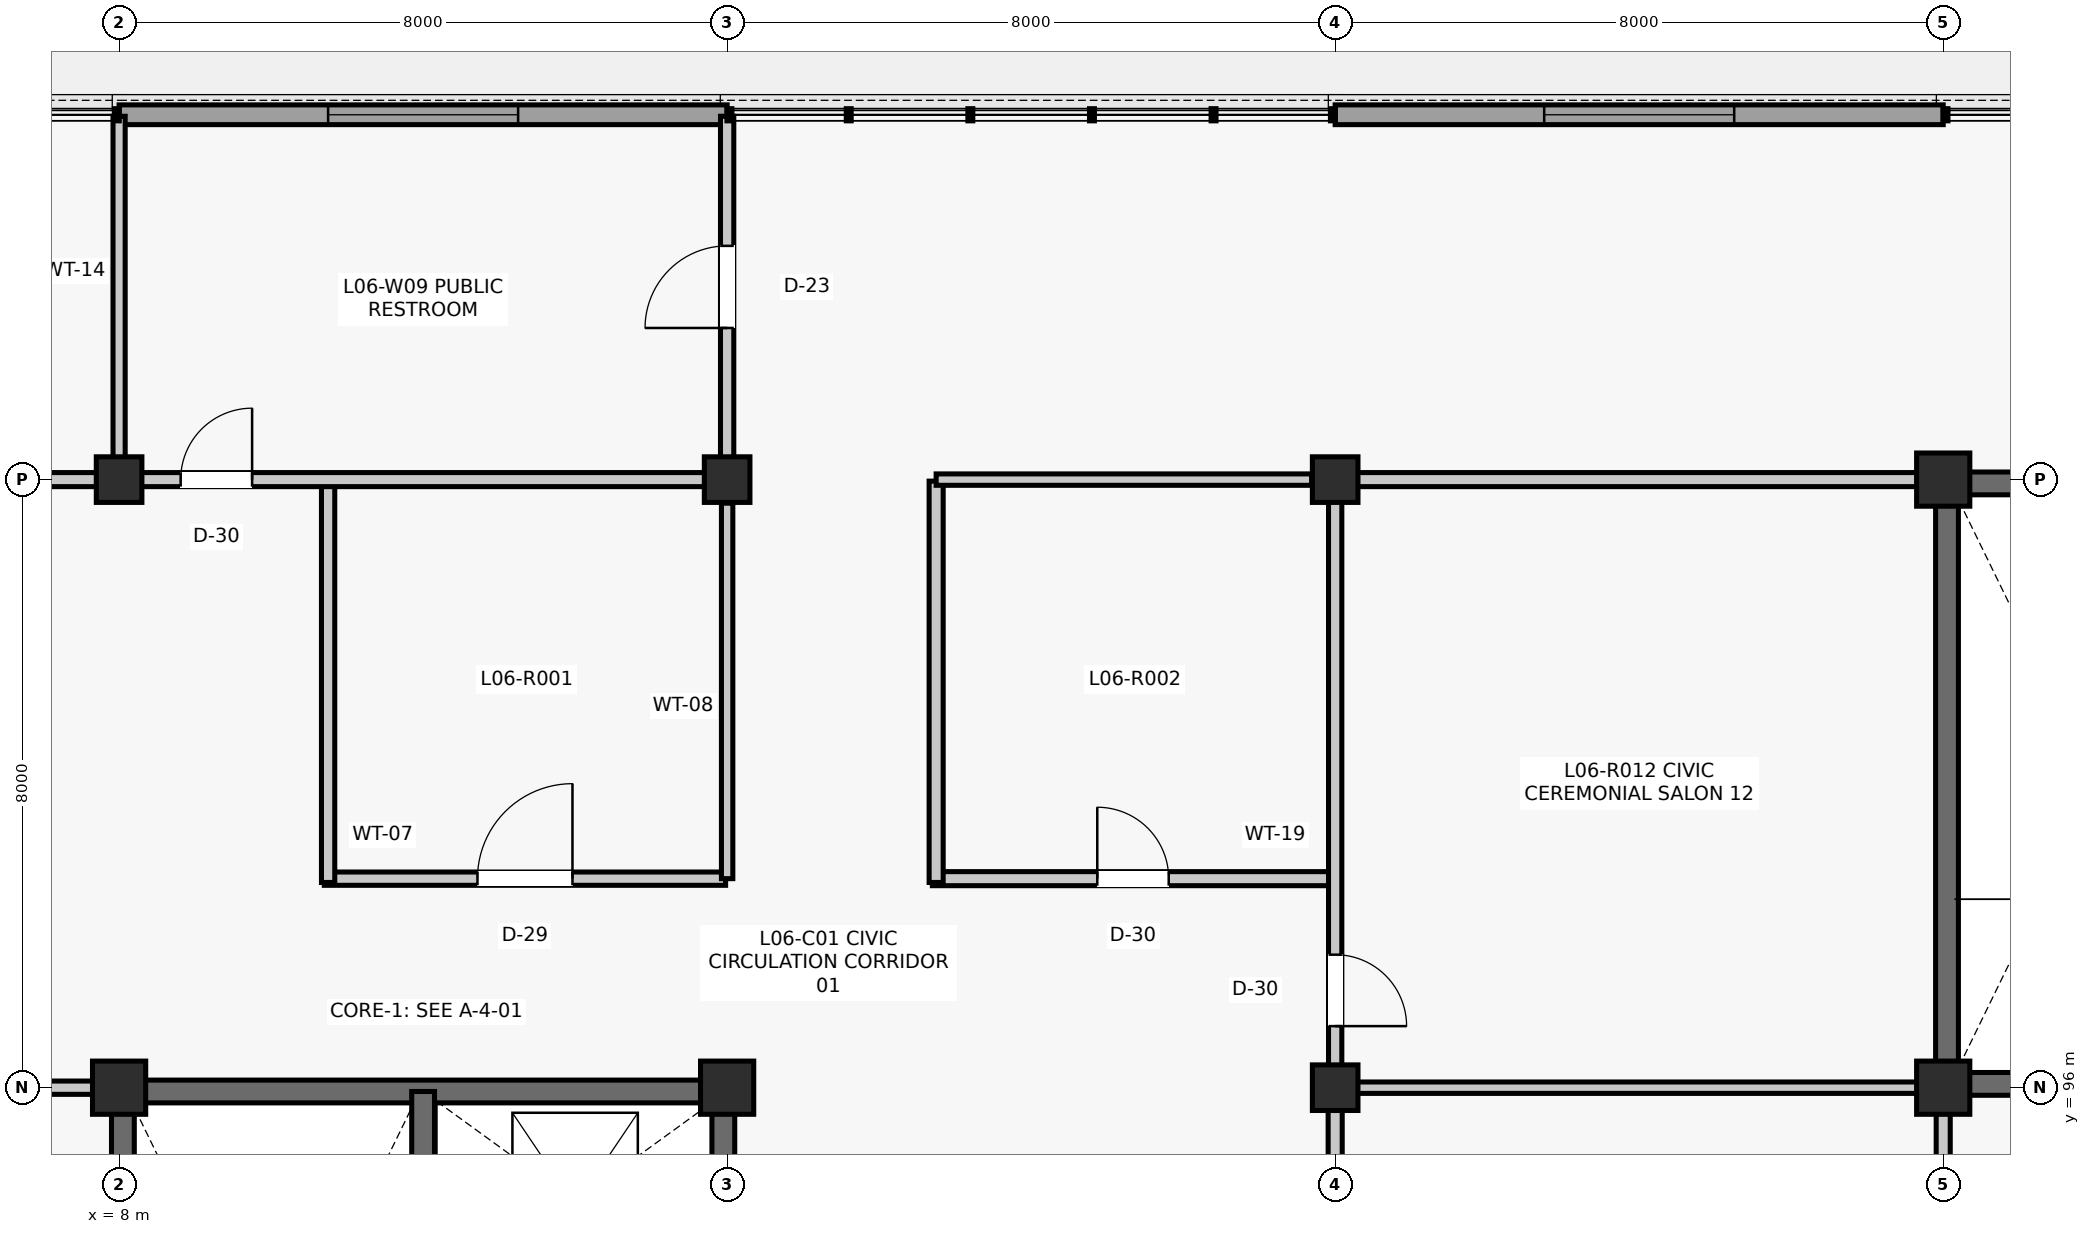
"""IFC4 building model, lengths in metres.
Left out: names, types, materials, properties, quantities, classifications, styles, units other than length and angle.
Written with IfcOpenShell. Run it as: python <this file> out.ifc"""

import sys

from ifc_helpers import new_model, si_unit, direction, frame, frame_2d, origin, origin_2d, place, context, subcontext, project, spatial, rectangle, extrude, element, fill, save


model = new_model("IFC4")
c1 = context("Model", 3, precision=1e-05, world=origin(), true_north=direction((0.0, 1.0)))
c2 = subcontext(c1, "Body", "Model", "MODEL_VIEW")
j1 = project(units=[si_unit("LENGTHUNIT", "METRE"), si_unit("PLANEANGLEUNIT", "RADIAN")], contexts=[c1])
p1 = place(None, origin())
s1 = spatial("IfcSite", under=j1, at=p1, CompositionType="ELEMENT")
p2 = place(p1, origin())
s2 = spatial("IfcBuilding", under=s1, at=p2, CompositionType="ELEMENT")
p3 = place(p2, frame((0.0, 0.0, 25.74)))
s3 = spatial("IfcBuildingStorey", under=s2, at=p3, CompositionType="ELEMENT", Elevation=25.74)
p4 = place(p3, frame((8.0, 96.0, 0.0), z_axis=(0.0, 0.0, 1.0), x_axis=(1.0, 0.0, 0.0)))
e1 = element("IfcColumn", 1, at=p4, inside=s3, PredefinedType="COLUMN", context=c2, shape_type="SweptSolid", body=[
    extrude(rectangle(XDim=0.7, YDim=0.7, at=origin_2d()), origin(), (0.0, 0.0, 1.0), 4.29),
])
p5 = place(p3, frame((8.0, 104.0, 0.0), z_axis=(0.0, 0.0, 1.0), x_axis=(1.0, 0.0, 0.0)))
e2 = element("IfcColumn", 2, at=p5, inside=s3, PredefinedType="COLUMN", context=c2, shape_type="SweptSolid", body=[
    extrude(rectangle(XDim=0.6, YDim=0.6, at=origin_2d()), origin(), (0.0, 0.0, 1.0), 4.29),
])
p6 = place(p3, frame((16.0, 96.0, 0.0), z_axis=(0.0, 0.0, 1.0), x_axis=(1.0, 0.0, 0.0)))
e3 = element("IfcColumn", 3, at=p6, inside=s3, PredefinedType="COLUMN", context=c2, shape_type="SweptSolid", body=[
    extrude(rectangle(XDim=0.7, YDim=0.7, at=origin_2d()), origin(), (0.0, 0.0, 1.0), 4.29),
])
for number, where, z_axis, x_axis in (
    (4, (16.0, 104.0, 0.0), (0.0, 0.0, 1.0), (1.0, 0.0, 0.0)),
    (5, (24.0, 96.0, 0.0), (0.0, 0.0, 1.0), (1.0, 0.0, 0.0)),
    (6, (24.0, 104.0, 0.0), (0.0, 0.0, 1.0), (1.0, 0.0, 0.0)),
):
    element("IfcColumn", number, at=place(p3, frame(where, z_axis=z_axis, x_axis=x_axis)), inside=s3, PredefinedType="COLUMN", context=c2, shape_type="SweptSolid", body=[
        extrude(rectangle(XDim=0.6, YDim=0.6, at=origin_2d()), origin(), (0.0, 0.0, 1.0), 4.29),
    ])
for number, where, z_axis, x_axis in (
    (7, (32.0, 96.0, 0.0), (0.0, 0.0, 1.0), (1.0, 0.0, 0.0)),
    (8, (32.0, 104.0, 0.0), (0.0, 0.0, 1.0), (1.0, 0.0, 0.0)),
):
    element("IfcColumn", number, at=place(p3, frame(where, z_axis=z_axis, x_axis=x_axis)), inside=s3, PredefinedType="COLUMN", context=c2, shape_type="SweptSolid", body=[
        extrude(rectangle(XDim=0.7, YDim=0.7, at=origin_2d()), origin(), (0.0, 0.0, 1.0), 4.29),
    ])
p7 = place(p3, frame((8.0, 108.8, 0.0), z_axis=(0.0, 0.0, 1.0), x_axis=(1.0, 0.0, 0.0)))
e9 = element("IfcWall", 9, at=p7, inside=s3, PredefinedType="SOLIDWALL", context=c2, shape_type="SweptSolid", body=[
    extrude(rectangle(XDim=8.0, YDim=0.26, at=frame_2d((4.0, 0.0))), origin(), (0.0, 0.0, 1.0), 4.09),
])
p8 = place(p7, frame((2.75, 0.0, 0.85)))
e10 = element("IfcOpeningElement", 10, at=p8, cuts=e9, PredefinedType="OPENING", context=c2, shape_type="SweptSolid", body=[
    extrude(rectangle(XDim=2.5, YDim=2.2, at=frame_2d((1.25, 1.1))), frame((0.0, 0.14, 0.0), z_axis=(0.0, -1.0, 0.0), x_axis=(1.0, 0.0, 0.0)), (0.0, 0.0, 1.0), 0.28),
])
p9 = place(p3, frame((24.0, 108.8, 0.0), z_axis=(0.0, 0.0, 1.0), x_axis=(1.0, 0.0, 0.0)))
e11 = element("IfcWall", 11, at=p9, inside=s3, PredefinedType="SOLIDWALL", context=c2, shape_type="SweptSolid", body=[
    extrude(rectangle(XDim=8.0, YDim=0.26, at=frame_2d((4.0, 0.0))), origin(), (0.0, 0.0, 1.0), 4.09),
])
p10 = place(p9, frame((2.75, 0.0, 0.85)))
e12 = element("IfcOpeningElement", 12, at=p10, cuts=e11, PredefinedType="OPENING", context=c2, shape_type="SweptSolid", body=[
    extrude(rectangle(XDim=2.5, YDim=2.2, at=frame_2d((1.25, 1.1))), frame((0.0, 0.14, 0.0), z_axis=(0.0, -1.0, 0.0), x_axis=(1.0, 0.0, 0.0)), (0.0, 0.0, 1.0), 0.28),
])
for number, where, z_axis, x_axis in (
    (13, (8.05, 88.24, 0.0), (0.0, 0.0, 1.0), (0.0, 1.0, 0.0)),
    (14, (8.24, 95.95, 0.0), (0.0, 0.0, 1.0), (1.0, 0.0, 0.0)),
):
    element("IfcWall", number, at=place(p3, frame(where, z_axis=z_axis, x_axis=x_axis)), inside=s3, PredefinedType="SHEAR", context=c2, shape_type="SweptSolid", body=[
        extrude(rectangle(XDim=7.52, YDim=0.3, at=frame_2d((3.76, 0.0))), origin(), (0.0, 0.0, 1.0), 4.09),
    ])
p11 = place(p3, frame((15.95, 88.24, 0.0), z_axis=(0.0, 0.0, 1.0), x_axis=(0.0, 1.0, 0.0)))
e15 = element("IfcWall", 15, at=p11, inside=s3, PredefinedType="SHEAR", context=c2, shape_type="SweptSolid", body=[
    extrude(rectangle(XDim=7.52, YDim=0.3, at=frame_2d((3.76, 0.0))), origin(), (0.0, 0.0, 1.0), 4.09),
])
p12 = place(p11, frame((3.55, 0.0, 0.0)))
e16 = element("IfcOpeningElement", 16, at=p12, cuts=e15, PredefinedType="OPENING", context=c2, shape_type="SweptSolid", body=[
    extrude(rectangle(XDim=1.05, YDim=2.15, at=frame_2d((0.525, 1.075))), frame((0.0, 0.16, 0.0), z_axis=(0.0, -1.0, 0.0), x_axis=(1.0, 0.0, 0.0)), (0.0, 0.0, 1.0), 0.32),
])
p13 = place(p3, frame((12.0, 88.05, 0.0), z_axis=(0.0, 0.0, 1.0), x_axis=(0.0, 1.0, 0.0)))
e17 = element("IfcWall", 17, at=p13, inside=s3, PredefinedType="SHEAR", context=c2, shape_type="SweptSolid", body=[
    extrude(rectangle(XDim=7.9, YDim=0.3, at=frame_2d((3.95, 0.0))), origin(), (0.0, 0.0, 1.0), 4.09),
])
p14 = place(p13, frame((0.55, 0.0, 0.0)))
e18 = element("IfcOpeningElement", 18, at=p14, cuts=e17, PredefinedType="OPENING", context=c2, shape_type="SweptSolid", body=[
    extrude(rectangle(XDim=1.1, YDim=2.15, at=frame_2d((0.55, 1.075))), frame((0.0, 0.16, 0.0), z_axis=(0.0, -1.0, 0.0), x_axis=(1.0, 0.0, 0.0)), (0.0, 0.0, 1.0), 0.32),
])
for number, where, z_axis, x_axis in (
    (19, (32.05, 96.24, 0.0), (0.0, 0.0, 1.0), (0.0, 1.0, 0.0)),
    (20, (32.24, 103.95, 0.0), (0.0, 0.0, 1.0), (1.0, 0.0, 0.0)),
):
    element("IfcWall", number, at=place(p3, frame(where, z_axis=z_axis, x_axis=x_axis)), inside=s3, PredefinedType="SHEAR", context=c2, shape_type="SweptSolid", body=[
        extrude(rectangle(XDim=7.52, YDim=0.3, at=frame_2d((3.76, 0.0))), origin(), (0.0, 0.0, 1.0), 4.09),
    ])
p15 = place(p3, frame((32.24, 96.05, 0.0), z_axis=(0.0, 0.0, 1.0), x_axis=(1.0, 0.0, 0.0)))
e21 = element("IfcWall", 21, at=p15, inside=s3, PredefinedType="SHEAR", context=c2, shape_type="SweptSolid", body=[
    extrude(rectangle(XDim=3.91, YDim=0.3, at=frame_2d((1.955, 0.0))), origin(), (0.0, 0.0, 1.0), 4.09),
])
p16 = place(p3, frame((10.7, 98.75, 0.0), z_axis=(0.0, 0.0, 1.0), x_axis=(1.0, 0.0, 0.0)))
e22 = element("IfcWall", 22, at=p16, inside=s3, PredefinedType="PARTITIONING", context=c2, shape_type="SweptSolid", body=[
    extrude(rectangle(XDim=5.28, YDim=0.175, at=frame_2d((2.64, 0.0))), origin(), (0.0, 0.0, 1.0), 3.408),
])
p17 = place(p16, frame((2.015, 0.0, 0.0)))
e23 = element("IfcOpeningElement", 23, at=p17, cuts=e22, PredefinedType="OPENING", context=c2, shape_type="SweptSolid", body=[
    extrude(rectangle(XDim=1.25, YDim=2.18, at=frame_2d((0.625, 1.09))), frame((0.0, 0.097, 0.0), z_axis=(0.0, -1.0, 0.0), x_axis=(1.0, 0.0, 0.0)), (0.0, 0.0, 1.0), 0.195),
])
p18 = place(p3, frame((10.75, 98.7, 0.0), z_axis=(0.0, 0.0, 1.0), x_axis=(0.0, 1.0, 0.0)))
e24 = element("IfcWall", 24, at=p18, inside=s3, PredefinedType="PARTITIONING", context=c2, shape_type="SweptSolid", body=[
    extrude(rectangle(XDim=5.28, YDim=0.175, at=frame_2d((2.64, 0.0))), origin(), (0.0, 0.0, 1.0), 3.408),
])
p19 = place(p3, frame((16.0, 98.75, 0.0), z_axis=(0.0, 0.0, 1.0), x_axis=(0.0, 1.0, 0.0)))
e25 = element("IfcWall", 25, at=p19, inside=s3, PredefinedType="PARTITIONING", context=c2, shape_type="SweptSolid", body=[
    extrude(rectangle(XDim=4.94, YDim=0.15, at=frame_2d((2.47, 0.0))), origin(), (0.0, 0.0, 1.0), 3.408),
])
p20 = place(p3, frame((18.7, 98.75, 0.0), z_axis=(0.0, 0.0, 1.0), x_axis=(1.0, 0.0, 0.0)))
e26 = element("IfcWall", 26, at=p20, inside=s3, PredefinedType="PARTITIONING", context=c2, shape_type="SweptSolid", body=[
    extrude(rectangle(XDim=5.28, YDim=0.185, at=frame_2d((2.64, 0.0))), origin(), (0.0, 0.0, 1.0), 3.408),
])
p21 = place(p20, frame((2.17, 0.0, 0.0)))
e27 = element("IfcOpeningElement", 27, at=p21, cuts=e26, PredefinedType="OPENING", context=c2, shape_type="SweptSolid", body=[
    extrude(rectangle(XDim=0.94, YDim=2.12, at=frame_2d((0.47, 1.06))), frame((0.0, 0.103, 0.0), z_axis=(0.0, -1.0, 0.0), x_axis=(1.0, 0.0, 0.0)), (0.0, 0.0, 1.0), 0.205),
])
p22 = place(p3, frame((18.75, 98.7, 0.0), z_axis=(0.0, 0.0, 1.0), x_axis=(0.0, 1.0, 0.0)))
e28 = element("IfcWall", 28, at=p22, inside=s3, PredefinedType="PARTITIONING", context=c2, shape_type="SweptSolid", body=[
    extrude(rectangle(XDim=5.28, YDim=0.185, at=frame_2d((2.64, 0.0))), origin(), (0.0, 0.0, 1.0), 3.408),
])
p23 = place(p3, frame((18.75, 104.0, 0.0), z_axis=(0.0, 0.0, 1.0), x_axis=(1.0, 0.0, 0.0)))
e29 = element("IfcWall", 29, at=p23, inside=s3, PredefinedType="PARTITIONING", context=c2, shape_type="SweptSolid", body=[
    extrude(rectangle(XDim=4.94, YDim=0.15, at=frame_2d((2.47, 0.0))), origin(), (0.0, 0.0, 1.0), 3.408),
])
p24 = place(p3, frame((3.22, 96.0, 0.0), z_axis=(0.0, 0.0, 1.0), x_axis=(1.0, 0.0, 0.0)))
e30 = element("IfcWall", 30, at=p24, inside=s3, PredefinedType="PARTITIONING", context=c2, shape_type="SweptSolid", body=[
    extrude(rectangle(XDim=4.44, YDim=0.175, at=frame_2d((2.22, 0.0))), origin(), (0.0, 0.0, 1.0), 3.408),
])
p25 = place(p24, frame((1.68, 0.0, 0.0)))
e31 = element("IfcOpeningElement", 31, at=p25, cuts=e30, PredefinedType="OPENING", context=c2, shape_type="SweptSolid", body=[
    extrude(rectangle(XDim=1.08, YDim=2.2, at=frame_2d((0.54, 1.1))), frame((0.0, 0.097, 0.0), z_axis=(0.0, -1.0, 0.0), x_axis=(1.0, 0.0, 0.0)), (0.0, 0.0, 1.0), 0.195),
])
p26 = place(p3, frame((3.22, 104.0, 0.0), z_axis=(0.0, 0.0, 1.0), x_axis=(1.0, 0.0, 0.0)))
e32 = element("IfcWall", 32, at=p26, inside=s3, PredefinedType="PARTITIONING", context=c2, shape_type="SweptSolid", body=[
    extrude(rectangle(XDim=4.49, YDim=0.185, at=frame_2d((2.245, 0.0))), origin(), (0.0, 0.0, 1.0), 3.408),
])
p27 = place(p26, frame((1.735, 0.0, 0.0)))
e33 = element("IfcOpeningElement", 33, at=p27, cuts=e32, PredefinedType="OPENING", context=c2, shape_type="SweptSolid", body=[
    extrude(rectangle(XDim=1.02, YDim=2.2, at=frame_2d((0.51, 1.1))), frame((0.0, 0.103, 0.0), z_axis=(0.0, -1.0, 0.0), x_axis=(1.0, 0.0, 0.0)), (0.0, 0.0, 1.0), 0.205),
])
p28 = place(p3, frame((8.0, 104.29, 0.0), z_axis=(0.0, 0.0, 1.0), x_axis=(0.0, 1.0, 0.0)))
e34 = element("IfcWall", 34, at=p28, inside=s3, PredefinedType="PARTITIONING", context=c2, shape_type="SweptSolid", body=[
    extrude(rectangle(XDim=4.49, YDim=0.16, at=frame_2d((2.245, 0.0))), origin(), (0.0, 0.0, 1.0), 3.408),
])
p29 = place(p3, frame((8.29, 104.0, 0.0), z_axis=(0.0, 0.0, 1.0), x_axis=(1.0, 0.0, 0.0)))
e35 = element("IfcWall", 35, at=p29, inside=s3, PredefinedType="PARTITIONING", context=c2, shape_type="SweptSolid", body=[
    extrude(rectangle(XDim=7.42, YDim=0.185, at=frame_2d((3.71, 0.0))), origin(), (0.0, 0.0, 1.0), 3.408),
])
p30 = place(p29, frame((0.52, 0.0, 0.0)))
e36 = element("IfcOpeningElement", 36, at=p30, cuts=e35, PredefinedType="OPENING", context=c2, shape_type="SweptSolid", body=[
    extrude(rectangle(XDim=0.94, YDim=2.12, at=frame_2d((0.47, 1.06))), frame((0.0, 0.103, 0.0), z_axis=(0.0, -1.0, 0.0), x_axis=(1.0, 0.0, 0.0)), (0.0, 0.0, 1.0), 0.205),
])
p31 = place(p3, frame((16.0, 104.29, 0.0), z_axis=(0.0, 0.0, 1.0), x_axis=(0.0, 1.0, 0.0)))
e37 = element("IfcWall", 37, at=p31, inside=s3, PredefinedType="PARTITIONING", context=c2, shape_type="SweptSolid", body=[
    extrude(rectangle(XDim=4.49, YDim=0.175, at=frame_2d((2.245, 0.0))), origin(), (0.0, 0.0, 1.0), 3.408),
])
p32 = place(p31, frame((1.705, 0.0, 0.0)))
e38 = element("IfcOpeningElement", 38, at=p32, cuts=e37, PredefinedType="OPENING", context=c2, shape_type="SweptSolid", body=[
    extrude(rectangle(XDim=1.08, YDim=2.2, at=frame_2d((0.54, 1.1))), frame((0.0, 0.097, 0.0), z_axis=(0.0, -1.0, 0.0), x_axis=(1.0, 0.0, 0.0)), (0.0, 0.0, 1.0), 0.195),
])
p33 = place(p3, frame((24.0, 91.22, 0.0), z_axis=(0.0, 0.0, 1.0), x_axis=(0.0, 1.0, 0.0)))
e39 = element("IfcWall", 39, at=p33, inside=s3, PredefinedType="PARTITIONING", context=c2, shape_type="SweptSolid", body=[
    extrude(rectangle(XDim=4.49, YDim=0.185, at=frame_2d((2.245, 0.0))), origin(), (0.0, 0.0, 1.0), 3.408),
])
p34 = place(p33, frame((1.735, 0.0, 0.0)))
e40 = element("IfcOpeningElement", 40, at=p34, cuts=e39, PredefinedType="OPENING", context=c2, shape_type="SweptSolid", body=[
    extrude(rectangle(XDim=1.02, YDim=2.2, at=frame_2d((0.51, 1.1))), frame((0.0, 0.103, 0.0), z_axis=(0.0, -1.0, 0.0), x_axis=(1.0, 0.0, 0.0)), (0.0, 0.0, 1.0), 0.205),
])
p35 = place(p3, frame((24.0, 96.29, 0.0), z_axis=(0.0, 0.0, 1.0), x_axis=(0.0, 1.0, 0.0)))
e41 = element("IfcWall", 41, at=p35, inside=s3, PredefinedType="PARTITIONING", context=c2, shape_type="SweptSolid", body=[
    extrude(rectangle(XDim=7.42, YDim=0.175, at=frame_2d((3.71, 0.0))), origin(), (0.0, 0.0, 1.0), 3.408),
])
p36 = place(p35, frame((0.52, 0.0, 0.0)))
e42 = element("IfcOpeningElement", 42, at=p36, cuts=e41, PredefinedType="OPENING", context=c2, shape_type="SweptSolid", body=[
    extrude(rectangle(XDim=0.94, YDim=2.12, at=frame_2d((0.47, 1.06))), frame((0.0, 0.097, 0.0), z_axis=(0.0, -1.0, 0.0), x_axis=(1.0, 0.0, 0.0)), (0.0, 0.0, 1.0), 0.195),
])
p37 = place(p3, frame((32.0, 91.22, 0.0), z_axis=(0.0, 0.0, 1.0), x_axis=(0.0, 1.0, 0.0)))
e43 = element("IfcWall", 43, at=p37, inside=s3, PredefinedType="PARTITIONING", context=c2, shape_type="SweptSolid", body=[
    extrude(rectangle(XDim=4.44, YDim=0.185, at=frame_2d((2.22, 0.0))), origin(), (0.0, 0.0, 1.0), 3.408),
])
p38 = place(p3, frame((24.29, 96.0, 0.0), z_axis=(0.0, 0.0, 1.0), x_axis=(1.0, 0.0, 0.0)))
e44 = element("IfcWall", 44, at=p38, inside=s3, PredefinedType="PARTITIONING", context=c2, shape_type="SweptSolid", body=[
    extrude(rectangle(XDim=7.37, YDim=0.15, at=frame_2d((3.685, 0.0))), origin(), (0.0, 0.0, 1.0), 3.408),
])
p39 = place(p3, frame((24.29, 104.0, 0.0), z_axis=(0.0, 0.0, 1.0), x_axis=(1.0, 0.0, 0.0)))
e45 = element("IfcWall", 45, at=p39, inside=s3, PredefinedType="PARTITIONING", context=c2, shape_type="SweptSolid", body=[
    extrude(rectangle(XDim=7.37, YDim=0.185, at=frame_2d((3.685, 0.0))), origin(), (0.0, 0.0, 1.0), 3.408),
])
p40 = place(p8, origin())
e46 = element("IfcWindow", 46, at=p40, inside=s3, PartitioningType="SINGLE_PANEL", PredefinedType="WINDOW", context=c2, shape_type="SweptSolid", body=[
    extrude(rectangle(XDim=2.5, YDim=2.2, at=frame_2d((1.25, 1.1))), frame((0.0, 0.03, 0.0), z_axis=(0.0, -1.0, 0.0), x_axis=(1.0, 0.0, 0.0)), (0.0, 0.0, 1.0), 0.06),
])
fill(e10, e46)
p41 = place(p10, origin())
e47 = element("IfcWindow", 47, at=p41, inside=s3, PartitioningType="SINGLE_PANEL", PredefinedType="WINDOW", context=c2, shape_type="SweptSolid", body=[
    extrude(rectangle(XDim=2.5, YDim=2.2, at=frame_2d((1.25, 1.1))), frame((0.0, 0.03, 0.0), z_axis=(0.0, -1.0, 0.0), x_axis=(1.0, 0.0, 0.0)), (0.0, 0.0, 1.0), 0.06),
])
fill(e12, e47)
p42 = place(p17, origin())
e48 = element("IfcDoor", 48, at=p42, inside=s3, OperationType="SINGLE_SWING_RIGHT", PredefinedType="DOOR", context=c2, shape_type="SweptSolid", body=[
    extrude(rectangle(XDim=1.25, YDim=2.18, at=frame_2d((0.625, 1.09))), frame((0.0, 0.025, 0.0), z_axis=(0.0, -1.0, 0.0), x_axis=(1.0, 0.0, 0.0)), (0.0, 0.0, 1.0), 0.05),
])
fill(e23, e48)
p43 = place(p21, origin())
e49 = element("IfcDoor", 49, at=p43, inside=s3, OperationType="SINGLE_SWING_LEFT", PredefinedType="DOOR", context=c2, shape_type="SweptSolid", body=[
    extrude(rectangle(XDim=0.94, YDim=2.12, at=frame_2d((0.47, 1.06))), frame((0.0, 0.025, 0.0), z_axis=(0.0, -1.0, 0.0), x_axis=(1.0, 0.0, 0.0)), (0.0, 0.0, 1.0), 0.05),
])
fill(e27, e49)
p44 = place(p30, origin())
e50 = element("IfcDoor", 50, at=p44, inside=s3, OperationType="SINGLE_SWING_RIGHT", PredefinedType="DOOR", context=c2, shape_type="SweptSolid", body=[
    extrude(rectangle(XDim=0.94, YDim=2.12, at=frame_2d((0.47, 1.06))), frame((0.0, 0.025, 0.0), z_axis=(0.0, -1.0, 0.0), x_axis=(1.0, 0.0, 0.0)), (0.0, 0.0, 1.0), 0.05),
])
fill(e36, e50)
p45 = place(p32, origin())
e51 = element("IfcDoor", 51, at=p45, inside=s3, OperationType="SINGLE_SWING_LEFT", PredefinedType="DOOR", context=c2, shape_type="SweptSolid", body=[
    extrude(rectangle(XDim=1.08, YDim=2.2, at=frame_2d((0.54, 1.1))), frame((0.0, 0.025, 0.0), z_axis=(0.0, -1.0, 0.0), x_axis=(1.0, 0.0, 0.0)), (0.0, 0.0, 1.0), 0.05),
])
fill(e38, e51)
p46 = place(p36, frame((0.94, 0.0, 0.0), z_axis=(0.0, 0.0, 1.0), x_axis=(-1.0, 0.0, 0.0)))
e52 = element("IfcDoor", 52, at=p46, inside=s3, OperationType="SINGLE_SWING_LEFT", PredefinedType="DOOR", context=c2, shape_type="SweptSolid", body=[
    extrude(rectangle(XDim=0.94, YDim=2.12, at=frame_2d((0.47, 1.06))), frame((0.0, 0.025, 0.0), z_axis=(0.0, -1.0, 0.0), x_axis=(1.0, 0.0, 0.0)), (0.0, 0.0, 1.0), 0.05),
])
fill(e42, e52)
save(model, sys.argv[1])
